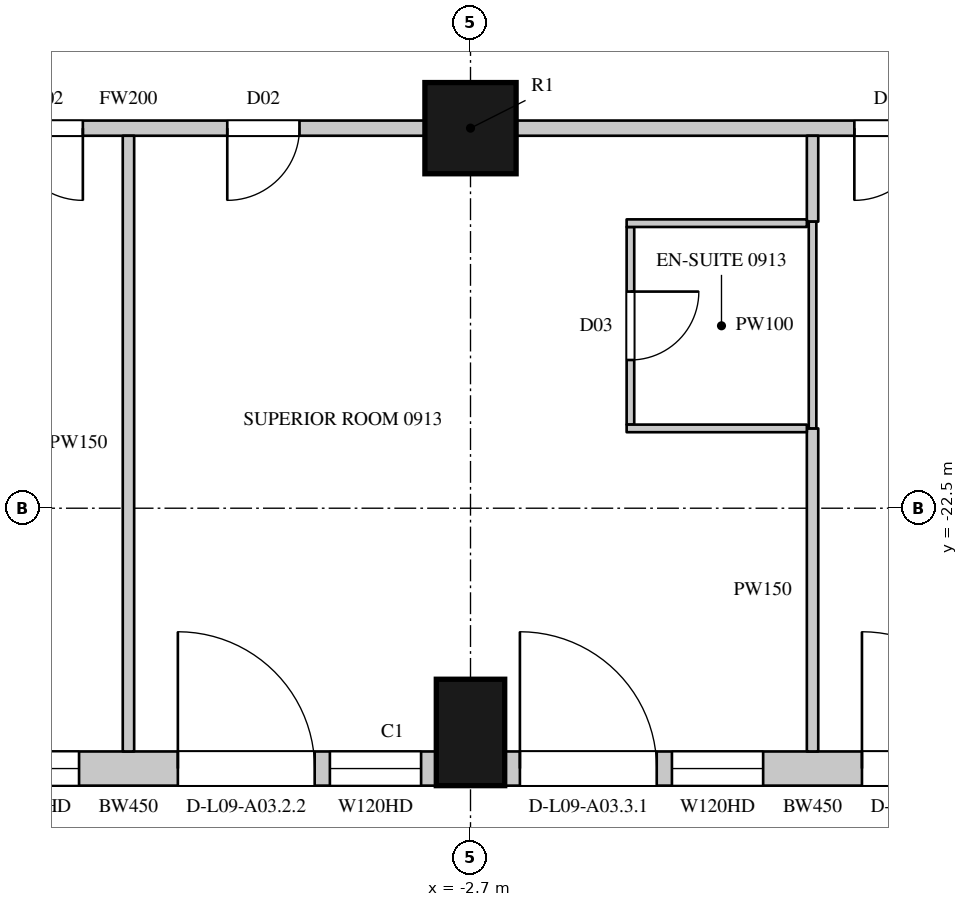
"""IFC4 building model, lengths in metres.
Left out: names, types, materials, properties, quantities, classifications, styles, units other than length and angle.
Written with IfcOpenShell. Run it as: python <this file> out.ifc"""

import sys

from ifc_helpers import new_model, si_unit, direction, frame, frame_2d, origin, origin_2d, place, context, subcontext, project, spatial, rectangle, circle, extrude, element, fill, save


model = new_model("IFC4")
c1 = context("Model", 3, precision=1e-05, world=origin(), true_north=direction((0.0, 1.0)))
c2 = subcontext(c1, "Body", "Model", "MODEL_VIEW")
j1 = project(units=[si_unit("LENGTHUNIT", "METRE"), si_unit("PLANEANGLEUNIT", "RADIAN")], contexts=[c1])
p1 = place(None, origin())
s1 = spatial("IfcSite", under=j1, at=p1, CompositionType="ELEMENT")
p2 = place(p1, origin())
s2 = spatial("IfcBuilding", under=s1, at=p2, CompositionType="ELEMENT")
p3 = place(p2, frame((0.0, 0.0, 62.7)))
s3 = spatial("IfcBuildingStorey", under=s2, at=p3, CompositionType="ELEMENT", Elevation=62.7)
p4 = place(p3, frame((-2.7, -25.45, 0.0), z_axis=(0.0, 0.0, 1.0), x_axis=(1.0, 0.0, 0.0)))
e1 = element("IfcColumn", 1, at=p4, inside=s3, PredefinedType="COLUMN", context=c2, shape_type="SweptSolid", body=[
    extrude(rectangle(XDim=0.9, YDim=1.4, at=origin_2d()), origin(), (0.0, 0.0, 1.0), 3.6),
])
p5 = place(p3, frame((-2.7, -17.5, 0.0), z_axis=(0.0, 0.0, 1.0), x_axis=(1.0, 0.0, 0.0)))
e2 = element("IfcColumn", 2, at=p5, inside=s3, PredefinedType="COLUMN", context=c2, shape_type="SweptSolid", body=[
    extrude(circle(Radius=0.6, at=origin_2d()), origin(), (0.0, 0.0, 1.0), 3.6),
])
p6 = place(p3, frame((-11.25, -25.925, 0.0), z_axis=(0.0, 0.0, 1.0), x_axis=(1.0, 0.0, 0.0)))
e3 = element("IfcWall", 3, at=p6, inside=s3, PredefinedType="SOLIDWALL", context=c2, shape_type="SweptSolid", body=[
    extrude(rectangle(XDim=8.1, YDim=0.45, at=frame_2d((4.05, 0.0))), origin(), (0.0, 0.0, 1.0), 3.3),
])
p7 = place(p6, frame((0.2, 0.0, 0.0)))
e4 = element("IfcOpeningElement", 4, at=p7, cuts=e3, PredefinedType="OPENING", context=c2, shape_type="SweptSolid", body=[
    extrude(rectangle(XDim=1.8, YDim=2.4, at=frame_2d((0.9, 1.2))), frame((0.0, 0.235, 0.0), z_axis=(0.0, -1.0, 0.0), x_axis=(1.0, 0.0, 0.0)), (0.0, 0.0, 1.0), 0.47),
])
p8 = place(p6, frame((2.2, 0.0, 1.05)))
e5 = element("IfcOpeningElement", 5, at=p8, cuts=e3, PredefinedType="OPENING", context=c2, shape_type="SweptSolid", body=[
    extrude(rectangle(XDim=1.2, YDim=2.0, at=frame_2d((0.6, 1.0))), frame((0.0, 0.235, 0.0), z_axis=(0.0, -1.0, 0.0), x_axis=(1.0, 0.0, 0.0)), (0.0, 0.0, 1.0), 0.47),
])
p9 = place(p6, frame((4.7, 0.0, 0.0)))
e6 = element("IfcOpeningElement", 6, at=p9, cuts=e3, PredefinedType="OPENING", context=c2, shape_type="SweptSolid", body=[
    extrude(rectangle(XDim=1.8, YDim=2.4, at=frame_2d((0.9, 1.2))), frame((0.0, 0.235, 0.0), z_axis=(0.0, -1.0, 0.0), x_axis=(1.0, 0.0, 0.0)), (0.0, 0.0, 1.0), 0.47),
])
p10 = place(p6, frame((6.7, 0.0, 1.05)))
e7 = element("IfcOpeningElement", 7, at=p10, cuts=e3, PredefinedType="OPENING", context=c2, shape_type="SweptSolid", body=[
    extrude(rectangle(XDim=1.2, YDim=2.0, at=frame_2d((0.6, 1.0))), frame((0.0, 0.235, 0.0), z_axis=(0.0, -1.0, 0.0), x_axis=(1.0, 0.0, 0.0)), (0.0, 0.0, 1.0), 0.47),
])
p11 = place(p3, frame((-2.25, -25.925, 0.0), z_axis=(0.0, 0.0, 1.0), x_axis=(1.0, 0.0, 0.0)))
e8 = element("IfcWall", 8, at=p11, inside=s3, PredefinedType="SOLIDWALL", context=c2, shape_type="SweptSolid", body=[
    extrude(rectangle(XDim=8.1, YDim=0.45, at=frame_2d((4.05, 0.0))), origin(), (0.0, 0.0, 1.0), 3.3),
])
p12 = place(p11, frame((0.2, 0.0, 0.0)))
e9 = element("IfcOpeningElement", 9, at=p12, cuts=e8, PredefinedType="OPENING", context=c2, shape_type="SweptSolid", body=[
    extrude(rectangle(XDim=1.8, YDim=2.4, at=frame_2d((0.9, 1.2))), frame((0.0, 0.235, 0.0), z_axis=(0.0, -1.0, 0.0), x_axis=(1.0, 0.0, 0.0)), (0.0, 0.0, 1.0), 0.47),
])
p13 = place(p11, frame((2.2, 0.0, 1.05)))
e10 = element("IfcOpeningElement", 10, at=p13, cuts=e8, PredefinedType="OPENING", context=c2, shape_type="SweptSolid", body=[
    extrude(rectangle(XDim=1.2, YDim=2.0, at=frame_2d((0.6, 1.0))), frame((0.0, 0.235, 0.0), z_axis=(0.0, -1.0, 0.0), x_axis=(1.0, 0.0, 0.0)), (0.0, 0.0, 1.0), 0.47),
])
p14 = place(p11, frame((4.7, 0.0, 0.0)))
e11 = element("IfcOpeningElement", 11, at=p14, cuts=e8, PredefinedType="OPENING", context=c2, shape_type="SweptSolid", body=[
    extrude(rectangle(XDim=1.8, YDim=2.4, at=frame_2d((0.9, 1.2))), frame((0.0, 0.235, 0.0), z_axis=(0.0, -1.0, 0.0), x_axis=(1.0, 0.0, 0.0)), (0.0, 0.0, 1.0), 0.47),
])
p15 = place(p11, frame((6.7, 0.0, 1.05)))
e12 = element("IfcOpeningElement", 12, at=p15, cuts=e8, PredefinedType="OPENING", context=c2, shape_type="SweptSolid", body=[
    extrude(rectangle(XDim=1.2, YDim=2.0, at=frame_2d((0.6, 1.0))), frame((0.0, 0.235, 0.0), z_axis=(0.0, -1.0, 0.0), x_axis=(1.0, 0.0, 0.0)), (0.0, 0.0, 1.0), 0.47),
])
p16 = place(p3, frame((-11.1, -17.5, 0.0), z_axis=(0.0, 0.0, 1.0), x_axis=(1.0, 0.0, 0.0)))
e13 = element("IfcWall", 13, at=p16, inside=s3, PredefinedType="PARTITIONING", context=c2, shape_type="SweptSolid", body=[
    extrude(rectangle(XDim=7.8, YDim=0.2, at=frame_2d((3.9, 0.0))), origin(), (0.0, 0.0, 1.0), 2.75),
])
p17 = place(p16, frame((2.35, 0.0, 0.0)))
e14 = element("IfcOpeningElement", 14, at=p17, cuts=e13, PredefinedType="OPENING", context=c2, shape_type="SweptSolid", body=[
    extrude(rectangle(XDim=0.95, YDim=2.2, at=frame_2d((0.475, 1.1))), frame((0.0, 0.11, 0.0), z_axis=(0.0, -1.0, 0.0), x_axis=(1.0, 0.0, 0.0)), (0.0, 0.0, 1.0), 0.22),
])
p18 = place(p16, frame((5.2, 0.0, 0.0)))
e15 = element("IfcOpeningElement", 15, at=p18, cuts=e13, PredefinedType="OPENING", context=c2, shape_type="SweptSolid", body=[
    extrude(rectangle(XDim=0.95, YDim=2.2, at=frame_2d((0.475, 1.1))), frame((0.0, 0.11, 0.0), z_axis=(0.0, -1.0, 0.0), x_axis=(1.0, 0.0, 0.0)), (0.0, 0.0, 1.0), 0.22),
])
p19 = place(p3, frame((-2.1, -17.5, 0.0), z_axis=(0.0, 0.0, 1.0), x_axis=(1.0, 0.0, 0.0)))
e16 = element("IfcWall", 16, at=p19, inside=s3, PredefinedType="PARTITIONING", context=c2, shape_type="SweptSolid", body=[
    extrude(rectangle(XDim=7.8, YDim=0.2, at=frame_2d((3.9, 0.0))), origin(), (0.0, 0.0, 1.0), 2.75),
])
p20 = place(p19, frame((4.45, 0.0, 0.0)))
e17 = element("IfcOpeningElement", 17, at=p20, cuts=e16, PredefinedType="OPENING", context=c2, shape_type="SweptSolid", body=[
    extrude(rectangle(XDim=0.95, YDim=2.2, at=frame_2d((0.475, 1.1))), frame((0.0, 0.11, 0.0), z_axis=(0.0, -1.0, 0.0), x_axis=(1.0, 0.0, 0.0)), (0.0, 0.0, 1.0), 0.22),
])
p21 = place(p3, frame((-7.2, -25.7, 0.0), z_axis=(0.0, 0.0, 1.0), x_axis=(0.0, 1.0, 0.0)))
e18 = element("IfcWall", 18, at=p21, inside=s3, PredefinedType="PARTITIONING", context=c2, shape_type="SweptSolid", body=[
    extrude(rectangle(XDim=8.1, YDim=0.15, at=frame_2d((4.05, 0.0))), origin(), (0.0, 0.0, 1.0), 2.65),
])
p22 = place(p3, frame((1.8, -25.7, 0.0), z_axis=(0.0, 0.0, 1.0), x_axis=(0.0, 1.0, 0.0)))
e19 = element("IfcWall", 19, at=p22, inside=s3, PredefinedType="PARTITIONING", context=c2, shape_type="SweptSolid", body=[
    extrude(rectangle(XDim=4.25, YDim=0.15, at=frame_2d((2.125, 0.0))), origin(), (0.0, 0.0, 1.0), 2.65),
])
p23 = place(p3, frame((1.8, -18.73, 0.0), z_axis=(0.0, 0.0, 1.0), x_axis=(0.0, 1.0, 0.0)))
e20 = element("IfcWall", 20, at=p23, inside=s3, PredefinedType="PARTITIONING", context=c2, shape_type="SweptSolid", body=[
    extrude(rectangle(XDim=1.13, YDim=0.15, at=frame_2d((0.565, 0.0))), origin(), (0.0, 0.0, 1.0), 2.65),
])
p24 = place(p3, frame((-0.596, -21.4, 0.0), z_axis=(0.0, 0.0, 1.0), x_axis=(0.0, 1.0, 0.0)))
e21 = element("IfcWall", 21, at=p24, inside=s3, PredefinedType="PARTITIONING", context=c2, shape_type="SweptSolid", body=[
    extrude(rectangle(XDim=2.6, YDim=0.1, at=frame_2d((1.3, 0.0))), origin(), (0.0, 0.0, 1.0), 3.3),
])
p25 = place(p24, frame((0.85, 0.0, 0.0)))
e22 = element("IfcOpeningElement", 22, at=p25, cuts=e21, PredefinedType="OPENING", context=c2, shape_type="SweptSolid", body=[
    extrude(rectangle(XDim=0.9, YDim=2.2, at=frame_2d((0.45, 1.1))), frame((0.0, 0.06, 0.0), z_axis=(0.0, -1.0, 0.0), x_axis=(1.0, 0.0, 0.0)), (0.0, 0.0, 1.0), 0.12),
])
for number, where, z_axis, x_axis in (
    (23, (-0.646, -21.45, 0.0), (0.0, 0.0, 1.0), (1.0, 0.0, 0.0)),
    (24, (-0.646, -18.75, 0.0), (0.0, 0.0, 1.0), (1.0, 0.0, 0.0)),
):
    element("IfcWall", number, at=place(p3, frame(where, z_axis=z_axis, x_axis=x_axis)), inside=s3, PredefinedType="PARTITIONING", context=c2, shape_type="SweptSolid", body=[
        extrude(rectangle(XDim=2.371, YDim=0.1, at=frame_2d((1.186, 0.0))), origin(), (0.0, 0.0, 1.0), 3.3),
    ])
p26 = place(p3, frame((1.8, -21.45, 0.0), z_axis=(0.0, 0.0, 1.0), x_axis=(0.0, 1.0, 0.0)))
e25 = element("IfcWall", 25, at=p26, inside=s3, PredefinedType="PARTITIONING", context=c2, shape_type="SweptSolid", body=[
    extrude(rectangle(XDim=2.72, YDim=0.1, at=frame_2d((1.36, 0.0))), origin(), (0.0, 0.0, 1.0), 2.65),
])
p27 = place(p8, origin())
e26 = element("IfcWindow", 26, at=p27, inside=s3, PartitioningType="SINGLE_PANEL", PredefinedType="WINDOW", context=c2, shape_type="SweptSolid", body=[
    extrude(rectangle(XDim=1.2, YDim=2.0, at=frame_2d((0.6, 1.0))), frame((0.0, 0.135, 0.0), z_axis=(0.0, -1.0, 0.0), x_axis=(1.0, 0.0, 0.0)), (0.0, 0.0, 1.0), 0.06),
])
fill(e5, e26)
p28 = place(p9, origin())
e27 = element("IfcDoor", 27, at=p28, inside=s3, OperationType="SLIDING_TO_LEFT", PredefinedType="DOOR", context=c2, shape_type="SweptSolid", body=[
    extrude(rectangle(XDim=1.8, YDim=2.4, at=frame_2d((0.9, 1.2))), frame((0.0, 0.13, 0.0), z_axis=(0.0, -1.0, 0.0), x_axis=(1.0, 0.0, 0.0)), (0.0, 0.0, 1.0), 0.05),
])
fill(e6, e27)
p29 = place(p10, origin())
e28 = element("IfcWindow", 28, at=p29, inside=s3, PartitioningType="SINGLE_PANEL", PredefinedType="WINDOW", context=c2, shape_type="SweptSolid", body=[
    extrude(rectangle(XDim=1.2, YDim=2.0, at=frame_2d((0.6, 1.0))), frame((0.0, 0.135, 0.0), z_axis=(0.0, -1.0, 0.0), x_axis=(1.0, 0.0, 0.0)), (0.0, 0.0, 1.0), 0.06),
])
fill(e7, e28)
p30 = place(p12, origin())
e29 = element("IfcDoor", 29, at=p30, inside=s3, OperationType="SLIDING_TO_LEFT", PredefinedType="DOOR", context=c2, shape_type="SweptSolid", body=[
    extrude(rectangle(XDim=1.8, YDim=2.4, at=frame_2d((0.9, 1.2))), frame((0.0, 0.13, 0.0), z_axis=(0.0, -1.0, 0.0), x_axis=(1.0, 0.0, 0.0)), (0.0, 0.0, 1.0), 0.05),
])
fill(e9, e29)
p31 = place(p13, origin())
e30 = element("IfcWindow", 30, at=p31, inside=s3, PartitioningType="SINGLE_PANEL", PredefinedType="WINDOW", context=c2, shape_type="SweptSolid", body=[
    extrude(rectangle(XDim=1.2, YDim=2.0, at=frame_2d((0.6, 1.0))), frame((0.0, 0.135, 0.0), z_axis=(0.0, -1.0, 0.0), x_axis=(1.0, 0.0, 0.0)), (0.0, 0.0, 1.0), 0.06),
])
fill(e10, e30)
p32 = place(p14, origin())
e31 = element("IfcDoor", 31, at=p32, inside=s3, OperationType="SLIDING_TO_LEFT", PredefinedType="DOOR", context=c2, shape_type="SweptSolid", body=[
    extrude(rectangle(XDim=1.8, YDim=2.4, at=frame_2d((0.9, 1.2))), frame((0.0, 0.13, 0.0), z_axis=(0.0, -1.0, 0.0), x_axis=(1.0, 0.0, 0.0)), (0.0, 0.0, 1.0), 0.05),
])
fill(e11, e31)
p33 = place(p17, origin())
e32 = element("IfcDoor", 32, at=p33, inside=s3, OperationType="SINGLE_SWING_LEFT", PredefinedType="DOOR", context=c2, shape_type="SweptSolid", body=[
    extrude(rectangle(XDim=0.95, YDim=2.2, at=frame_2d((0.475, 1.1))), frame((0.0, 0.025, 0.0), z_axis=(0.0, -1.0, 0.0), x_axis=(1.0, 0.0, 0.0)), (0.0, 0.0, 1.0), 0.05),
])
fill(e14, e32)
p34 = place(p18, origin())
e33 = element("IfcDoor", 33, at=p34, inside=s3, OperationType="SINGLE_SWING_RIGHT", PredefinedType="DOOR", context=c2, shape_type="SweptSolid", body=[
    extrude(rectangle(XDim=0.95, YDim=2.2, at=frame_2d((0.475, 1.1))), frame((0.0, 0.025, 0.0), z_axis=(0.0, -1.0, 0.0), x_axis=(1.0, 0.0, 0.0)), (0.0, 0.0, 1.0), 0.05),
])
fill(e15, e33)
p35 = place(p25, origin())
e34 = element("IfcDoor", 34, at=p35, inside=s3, OperationType="SINGLE_SWING_LEFT", PredefinedType="DOOR", context=c2, shape_type="SweptSolid", body=[
    extrude(rectangle(XDim=0.9, YDim=2.2, at=frame_2d((0.45, 1.1))), frame((0.0, 0.025, 0.0), z_axis=(0.0, -1.0, 0.0), x_axis=(1.0, 0.0, 0.0)), (0.0, 0.0, 1.0), 0.05),
])
fill(e22, e34)
p36 = place(p20, origin())
e35 = element("IfcDoor", 35, at=p36, inside=s3, OperationType="SINGLE_SWING_RIGHT", PredefinedType="DOOR", context=c2, shape_type="SweptSolid", body=[
    extrude(rectangle(XDim=0.95, YDim=2.2, at=frame_2d((0.475, 1.1))), frame((0.0, 0.025, 0.0), z_axis=(0.0, -1.0, 0.0), x_axis=(1.0, 0.0, 0.0)), (0.0, 0.0, 1.0), 0.05),
])
fill(e17, e35)
save(model, sys.argv[1])
